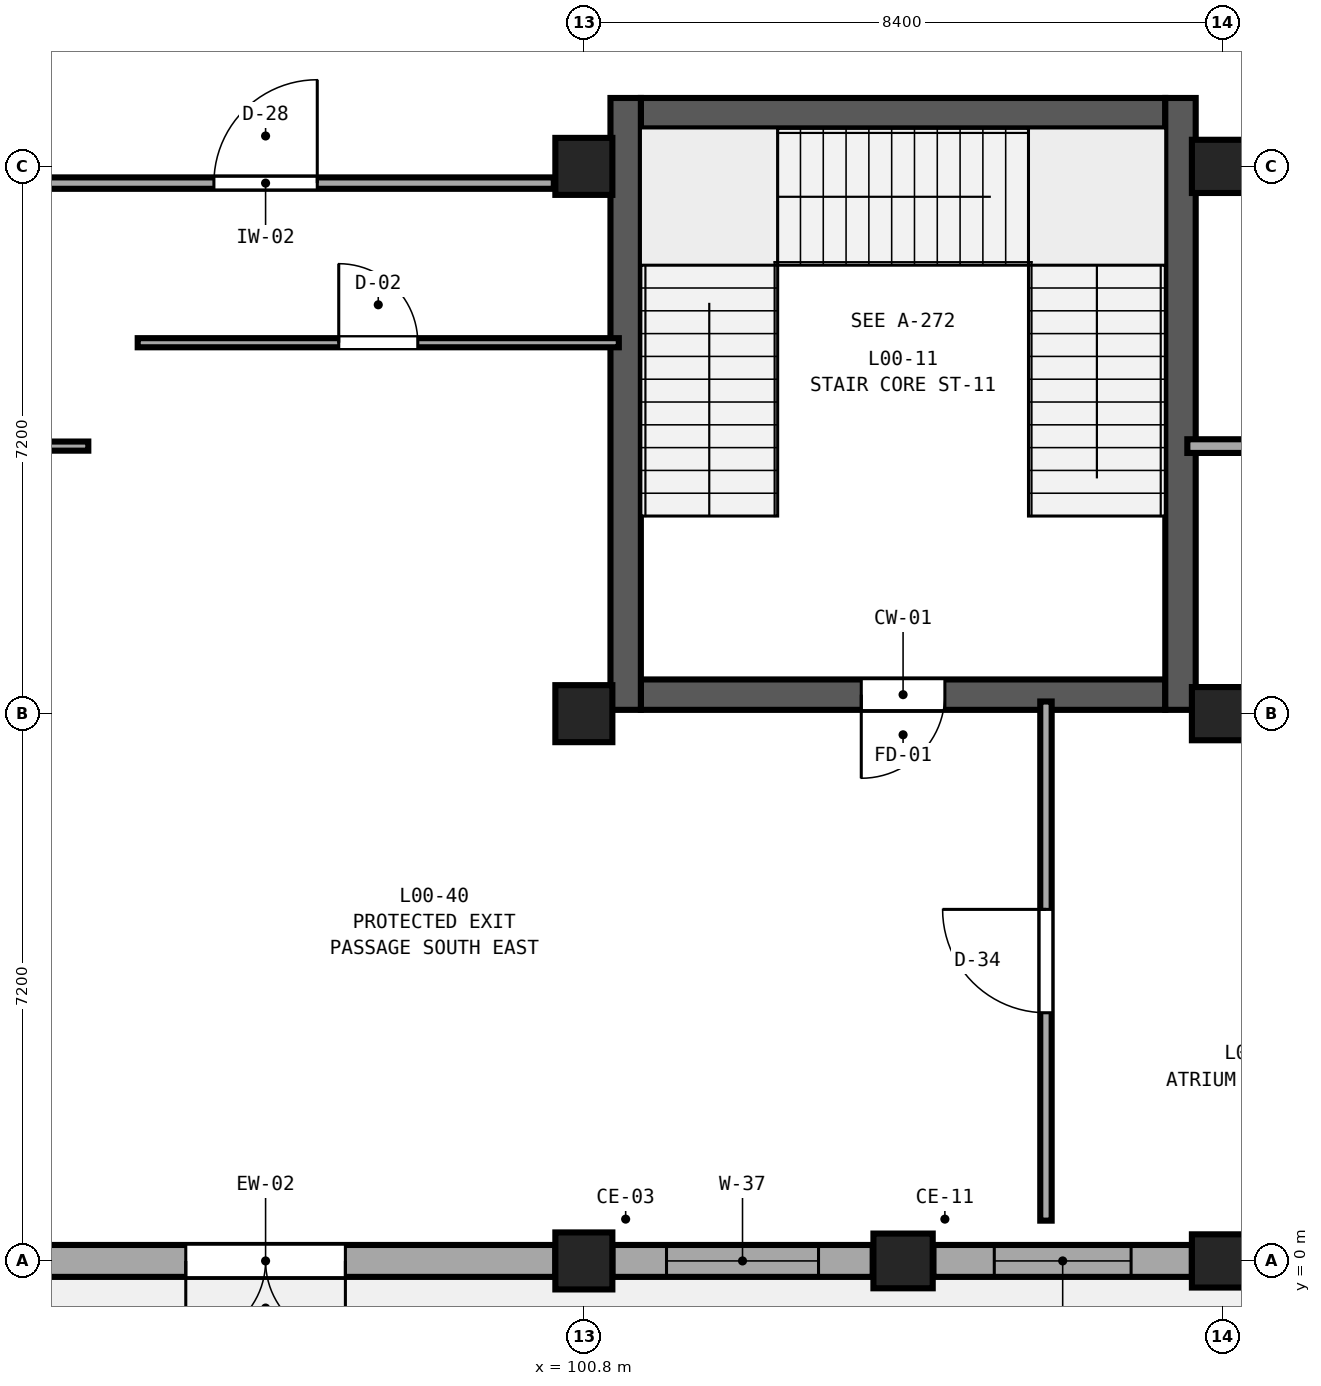
"""IFC4 building model, lengths in metres.
Left out: names, types, materials, properties, quantities, classifications, styles, units other than length and angle.
Written with IfcOpenShell. Run it as: python <this file> out.ifc"""

import sys

from ifc_helpers import new_model, si_unit, direction, frame, frame_2d, origin, origin_2d, place, context, subcontext, project, spatial, rectangle, extrude, element, fill, save


model = new_model("IFC4")
c1 = context("Model", 3, precision=1e-05, world=origin(), true_north=direction((0.0, 1.0)))
c2 = subcontext(c1, "Body", "Model", "MODEL_VIEW")
j1 = project(units=[si_unit("LENGTHUNIT", "METRE"), si_unit("PLANEANGLEUNIT", "RADIAN")], contexts=[c1])
p1 = place(None, origin())
s1 = spatial("IfcSite", under=j1, at=p1, CompositionType="ELEMENT")
p2 = place(p1, origin())
s2 = spatial("IfcBuilding", under=s1, at=p2, CompositionType="ELEMENT")
p3 = place(p2, origin())
s3 = spatial("IfcBuildingStorey", under=s2, at=p3, CompositionType="ELEMENT", Elevation=0.0)
for number, where, z_axis, x_axis in (
    (1, (100.8, 0.0, 0.0), (0.0, 0.0, 1.0), (1.0, 0.0, 0.0)),
    (2, (100.8, 7.2, 0.0), (0.0, 0.0, 1.0), (1.0, 0.0, 0.0)),
    (3, (100.8, 14.4, 0.0), (0.0, 0.0, 1.0), (1.0, 0.0, 0.0)),
):
    element("IfcColumn", number, at=place(p3, frame(where, z_axis=z_axis, x_axis=x_axis)), inside=s3, PredefinedType="COLUMN", context=c2, shape_type="SweptSolid", body=[
        extrude(rectangle(XDim=0.75, YDim=0.75, at=origin_2d()), origin(), (0.0, 0.0, 1.0), 5.4),
    ])
for number, where, z_axis, x_axis in (
    (4, (109.2, 0.0, 0.0), (0.0, 0.0, 1.0), (1.0, 0.0, 0.0)),
    (5, (109.2, 7.2, 0.0), (0.0, 0.0, 1.0), (1.0, 0.0, 0.0)),
    (6, (109.2, 14.4, 0.0), (0.0, 0.0, 1.0), (1.0, 0.0, 0.0)),
):
    element("IfcColumn", number, at=place(p3, frame(where, z_axis=z_axis, x_axis=x_axis)), inside=s3, PredefinedType="COLUMN", context=c2, shape_type="SweptSolid", body=[
        extrude(rectangle(XDim=0.8, YDim=0.7, at=origin_2d()), origin(), (0.0, 0.0, 1.0), 5.4),
    ])
p4 = place(p3, frame((105.0, 0.0, 0.0), z_axis=(0.0, 0.0, 1.0), x_axis=(1.0, 0.0, 0.0)))
e7 = element("IfcColumn", 7, at=p4, inside=s3, PredefinedType="PILASTER", context=c2, shape_type="SweptSolid", body=[
    extrude(rectangle(XDim=0.78, YDim=0.72, at=origin_2d()), origin(), (0.0, 0.0, 1.0), 5.4),
])
p5 = place(p3, frame((100.425, 0.0, 0.0), z_axis=(0.0, 0.0, 1.0), x_axis=(-1.0, 0.0, 0.0)))
e8 = element("IfcWall", 8, at=p5, inside=s3, PredefinedType="SOLIDWALL", context=c2, shape_type="SweptSolid", body=[
    extrude(rectangle(XDim=7.625, YDim=0.42, at=frame_2d((3.812, 0.0))), origin(), (0.0, 0.0, 1.0), 4.53),
])
p6 = place(p5, frame((2.762, 0.0, 0.0)))
e9 = element("IfcOpeningElement", 9, at=p6, cuts=e8, PredefinedType="OPENING", context=c2, shape_type="SweptSolid", body=[
    extrude(rectangle(XDim=2.1, YDim=2.45, at=frame_2d((1.05, 1.225))), frame((0.0, 0.23, 0.0), z_axis=(0.0, -1.0, 0.0), x_axis=(1.0, 0.0, 0.0)), (0.0, 0.0, 1.0), 0.46),
])
p7 = place(p3, frame((108.8, 0.0, 0.0), z_axis=(0.0, 0.0, 1.0), x_axis=(-1.0, 0.0, 0.0)))
e10 = element("IfcWall", 10, at=p7, inside=s3, PredefinedType="SOLIDWALL", context=c2, shape_type="SweptSolid", body=[
    extrude(rectangle(XDim=3.4, YDim=0.42, at=frame_2d((1.7, 0.0))), origin(), (0.0, 0.0, 1.0), 4.53),
])
p8 = place(p7, frame((0.8, 0.0, 0.75)))
e11 = element("IfcOpeningElement", 11, at=p8, cuts=e10, PredefinedType="OPENING", context=c2, shape_type="SweptSolid", body=[
    extrude(rectangle(XDim=1.8, YDim=2.62, at=frame_2d((0.9, 1.31))), frame((0.0, 0.23, 0.0), z_axis=(0.0, -1.0, 0.0), x_axis=(1.0, 0.0, 0.0)), (0.0, 0.0, 1.0), 0.46),
])
p9 = place(p3, frame((104.6, 0.0, 0.0), z_axis=(0.0, 0.0, 1.0), x_axis=(-1.0, 0.0, 0.0)))
e12 = element("IfcWall", 12, at=p9, inside=s3, PredefinedType="SOLIDWALL", context=c2, shape_type="SweptSolid", body=[
    extrude(rectangle(XDim=3.425, YDim=0.42, at=frame_2d((1.712, 0.0))), origin(), (0.0, 0.0, 1.0), 4.53),
])
p10 = place(p9, frame((0.712, 0.0, 0.75)))
e13 = element("IfcOpeningElement", 13, at=p10, cuts=e12, PredefinedType="OPENING", context=c2, shape_type="SweptSolid", body=[
    extrude(rectangle(XDim=2.0, YDim=2.62, at=frame_2d((1.0, 1.31))), frame((0.0, 0.23, 0.0), z_axis=(0.0, -1.0, 0.0), x_axis=(1.0, 0.0, 0.0)), (0.0, 0.0, 1.0), 0.46),
])
p11 = place(p3, frame((108.45, 7.45, 0.0), z_axis=(0.0, 0.0, 1.0), x_axis=(-1.0, 0.0, 0.0)))
e14 = element("IfcWall", 14, at=p11, inside=s3, PredefinedType="SHEAR", context=c2, shape_type="SweptSolid", body=[
    extrude(rectangle(XDim=6.9, YDim=0.4, at=frame_2d((3.45, 0.0))), origin(), (0.0, 0.0, 1.0), 5.4),
])
p12 = place(p11, frame((2.9, 0.0, 0.0)))
e15 = element("IfcOpeningElement", 15, at=p12, cuts=e14, PredefinedType="OPENING", context=c2, shape_type="SweptSolid", body=[
    extrude(rectangle(XDim=1.1, YDim=2.2, at=frame_2d((0.55, 1.1))), frame((0.0, 0.22, 0.0), z_axis=(0.0, -1.0, 0.0), x_axis=(1.0, 0.0, 0.0)), (0.0, 0.0, 1.0), 0.44),
])
p13 = place(p3, frame((101.55, 15.1, 0.0), z_axis=(0.0, 0.0, 1.0), x_axis=(1.0, 0.0, 0.0)))
e16 = element("IfcWall", 16, at=p13, inside=s3, PredefinedType="SHEAR", context=c2, shape_type="SweptSolid", body=[
    extrude(rectangle(XDim=6.9, YDim=0.4, at=frame_2d((3.45, 0.0))), origin(), (0.0, 0.0, 1.0), 5.4),
])
for number, where, z_axis, x_axis in (
    (17, (101.35, 15.3, 0.0), (0.0, 0.0, 1.0), (0.0, -1.0, 0.0)),
    (18, (108.65, 7.25, 0.0), (0.0, 0.0, 1.0), (0.0, 1.0, 0.0)),
):
    element("IfcWall", number, at=place(p3, frame(where, z_axis=z_axis, x_axis=x_axis)), inside=s3, PredefinedType="SHEAR", context=c2, shape_type="SweptSolid", body=[
        extrude(rectangle(XDim=8.05, YDim=0.4, at=frame_2d((4.025, 0.0))), origin(), (0.0, 0.0, 1.0), 5.4),
    ])
p14 = place(p3, frame((92.82, 14.18, 0.0), z_axis=(0.0, 0.0, 1.0), x_axis=(1.0, 0.0, 0.0)))
e19 = element("IfcWall", 19, at=p14, inside=s3, PredefinedType="PARTITIONING", context=c2, shape_type="SweptSolid", body=[
    extrude(rectangle(XDim=7.585, YDim=0.15, at=frame_2d((3.792, 0.0))), origin(), (0.0, 0.0, 1.0), 4.58),
])
p15 = place(p14, frame((3.113, 0.0, 0.0)))
e20 = element("IfcOpeningElement", 20, at=p15, cuts=e19, PredefinedType="OPENING", context=c2, shape_type="SweptSolid", body=[
    extrude(rectangle(XDim=1.36, YDim=2.37, at=frame_2d((0.68, 1.185))), frame((0.0, 0.095, 0.0), z_axis=(0.0, -1.0, 0.0), x_axis=(1.0, 0.0, 0.0)), (0.0, 0.0, 1.0), 0.19),
])
p16 = place(p3, frame((84.73, 10.72, 0.0), z_axis=(0.0, 0.0, 1.0), x_axis=(1.0, 0.0, 0.0)))
e21 = element("IfcWall", 21, at=p16, inside=s3, PredefinedType="PARTITIONING", context=c2, shape_type="SweptSolid", body=[
    extrude(rectangle(XDim=9.55, YDim=0.12, at=frame_2d((4.775, 0.0))), origin(), (0.0, 0.0, 1.0), 5.08),
])
p17 = place(p16, frame((4.255, 0.0, 0.0)))
e22 = element("IfcOpeningElement", 22, at=p17, cuts=e21, PredefinedType="OPENING", context=c2, shape_type="SweptSolid", body=[
    extrude(rectangle(XDim=1.04, YDim=2.21, at=frame_2d((0.52, 1.105))), frame((0.0, 0.08, 0.0), z_axis=(0.0, -1.0, 0.0), x_axis=(1.0, 0.0, 0.0)), (0.0, 0.0, 1.0), 0.16),
])
p18 = place(p3, frame((106.88, 0.53, 0.0), z_axis=(0.0, 0.0, 1.0), x_axis=(0.0, 1.0, 0.0)))
e23 = element("IfcWall", 23, at=p18, inside=s3, PredefinedType="PARTITIONING", context=c2, shape_type="SweptSolid", body=[
    extrude(rectangle(XDim=6.83, YDim=0.15, at=frame_2d((3.415, 0.0))), origin(), (0.0, 0.0, 1.0), 5.08),
])
p19 = place(p18, frame((2.735, 0.0, 0.0)))
e24 = element("IfcOpeningElement", 24, at=p19, cuts=e23, PredefinedType="OPENING", context=c2, shape_type="SweptSolid", body=[
    extrude(rectangle(XDim=1.36, YDim=2.45, at=frame_2d((0.68, 1.225))), frame((0.0, 0.095, 0.0), z_axis=(0.0, -1.0, 0.0), x_axis=(1.0, 0.0, 0.0)), (0.0, 0.0, 1.0), 0.19),
])
p20 = place(p3, frame((94.93, 12.08, 0.0), z_axis=(0.0, 0.0, 1.0), x_axis=(1.0, 0.0, 0.0)))
e25 = element("IfcWall", 25, at=p20, inside=s3, PredefinedType="PARTITIONING", context=c2, shape_type="SweptSolid", body=[
    extrude(rectangle(XDim=6.33, YDim=0.12, at=frame_2d((3.165, 0.0))), origin(), (0.0, 0.0, 1.0), 5.08),
])
p21 = place(p20, frame((2.645, 0.0, 0.0)))
e26 = element("IfcOpeningElement", 26, at=p21, cuts=e25, PredefinedType="OPENING", context=c2, shape_type="SweptSolid", body=[
    extrude(rectangle(XDim=1.04, YDim=2.05, at=frame_2d((0.52, 1.025))), frame((0.0, 0.08, 0.0), z_axis=(0.0, -1.0, 0.0), x_axis=(1.0, 0.0, 0.0)), (0.0, 0.0, 1.0), 0.16),
])
p22 = place(p3, frame((108.74, 10.72, 0.0), z_axis=(0.0, 0.0, 1.0), x_axis=(1.0, 0.0, 0.0)))
e27 = element("IfcWall", 27, at=p22, inside=s3, PredefinedType="PARTITIONING", context=c2, shape_type="SweptSolid", body=[
    extrude(rectangle(XDim=3.31, YDim=0.18, at=frame_2d((1.655, 0.0))), origin(), (0.0, 0.0, 1.0), 5.08),
])
p23 = place(p22, frame((1.224, 0.0, 0.0)))
e28 = element("IfcOpeningElement", 28, at=p23, cuts=e27, PredefinedType="OPENING", context=c2, shape_type="SweptSolid", body=[
    extrude(rectangle(XDim=1.2, YDim=2.45, at=frame_2d((0.6, 1.225))), frame((0.0, 0.11, 0.0), z_axis=(0.0, -1.0, 0.0), x_axis=(1.0, 0.0, 0.0)), (0.0, 0.0, 1.0), 0.22),
])
p24 = place(p6, origin())
e29 = element("IfcDoor", 29, at=p24, inside=s3, OperationType="DOUBLE_DOOR_SINGLE_SWING", PredefinedType="DOOR", context=c2, shape_type="SweptSolid", body=[
    extrude(rectangle(XDim=2.1, YDim=2.45, at=frame_2d((1.05, 1.225))), frame((0.0, 0.025, 0.0), z_axis=(0.0, -1.0, 0.0), x_axis=(1.0, 0.0, 0.0)), (0.0, 0.0, 1.0), 0.05),
])
fill(e9, e29)
p25 = place(p8, origin())
e30 = element("IfcWindow", 30, at=p25, inside=s3, PartitioningType="DOUBLE_PANEL_VERTICAL", PredefinedType="WINDOW", context=c2, shape_type="SweptSolid", body=[
    extrude(rectangle(XDim=1.8, YDim=2.62, at=frame_2d((0.9, 1.31))), frame((0.0, 0.03, 0.0), z_axis=(0.0, -1.0, 0.0), x_axis=(1.0, 0.0, 0.0)), (0.0, 0.0, 1.0), 0.06),
])
fill(e11, e30)
p26 = place(p10, origin())
e31 = element("IfcWindow", 31, at=p26, inside=s3, PartitioningType="TRIPLE_PANEL_VERTICAL", PredefinedType="WINDOW", context=c2, shape_type="SweptSolid", body=[
    extrude(rectangle(XDim=2.0, YDim=2.62, at=frame_2d((1.0, 1.31))), frame((0.0, 0.03, 0.0), z_axis=(0.0, -1.0, 0.0), x_axis=(1.0, 0.0, 0.0)), (0.0, 0.0, 1.0), 0.06),
])
fill(e13, e31)
p27 = place(p12, origin())
e32 = element("IfcDoor", 32, at=p27, inside=s3, OperationType="SINGLE_SWING_RIGHT", PredefinedType="DOOR", context=c2, shape_type="SweptSolid", body=[
    extrude(rectangle(XDim=1.1, YDim=2.2, at=frame_2d((0.55, 1.1))), frame((0.0, 0.025, 0.0), z_axis=(0.0, -1.0, 0.0), x_axis=(1.0, 0.0, 0.0)), (0.0, 0.0, 1.0), 0.05),
])
fill(e15, e32)
p28 = place(p15, origin())
e33 = element("IfcDoor", 33, at=p28, inside=s3, OperationType="SINGLE_SWING_RIGHT", PredefinedType="DOOR", context=c2, shape_type="SweptSolid", body=[
    extrude(rectangle(XDim=1.36, YDim=2.37, at=frame_2d((0.68, 1.185))), frame((0.0, 0.025, 0.0), z_axis=(0.0, -1.0, 0.0), x_axis=(1.0, 0.0, 0.0)), (0.0, 0.0, 1.0), 0.05),
])
fill(e20, e33)
p29 = place(p19, frame((1.36, 0.0, 0.0), z_axis=(0.0, 0.0, 1.0), x_axis=(-1.0, 0.0, 0.0)))
e34 = element("IfcDoor", 34, at=p29, inside=s3, OperationType="SINGLE_SWING_RIGHT", PredefinedType="DOOR", context=c2, shape_type="SweptSolid", body=[
    extrude(rectangle(XDim=1.36, YDim=2.45, at=frame_2d((0.68, 1.225))), frame((0.0, 0.025, 0.0), z_axis=(0.0, -1.0, 0.0), x_axis=(1.0, 0.0, 0.0)), (0.0, 0.0, 1.0), 0.05),
])
fill(e24, e34)
p30 = place(p21, frame((1.04, 0.0, 0.0), z_axis=(0.0, 0.0, 1.0), x_axis=(-1.0, 0.0, 0.0)))
e35 = element("IfcDoor", 35, at=p30, inside=s3, OperationType="SINGLE_SWING_LEFT", PredefinedType="DOOR", context=c2, shape_type="SweptSolid", body=[
    extrude(rectangle(XDim=1.04, YDim=2.05, at=frame_2d((0.52, 1.025))), frame((0.0, 0.025, 0.0), z_axis=(0.0, -1.0, 0.0), x_axis=(1.0, 0.0, 0.0)), (0.0, 0.0, 1.0), 0.05),
])
fill(e26, e35)
save(model, sys.argv[1])
